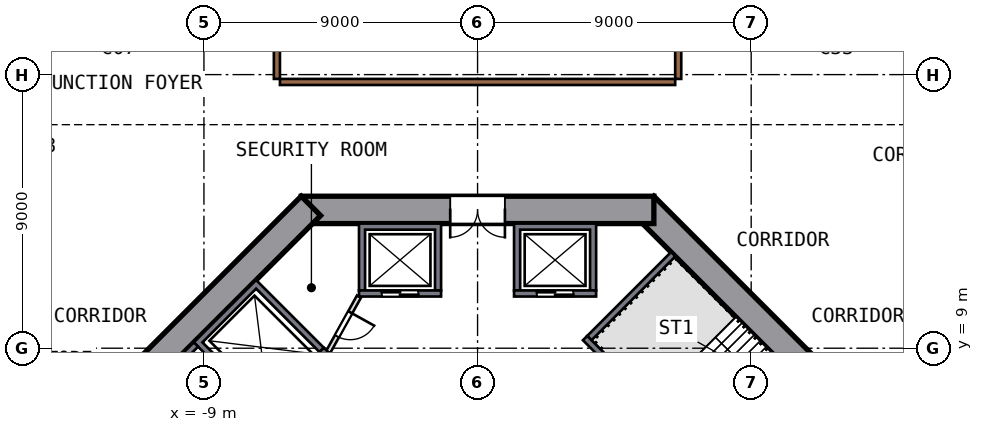
"""IFC4 building model, lengths in metres.
Left out: names, types, materials, properties, quantities, classifications, styles, units other than length and angle.
Written with IfcOpenShell. Run it as: python <this file> out.ifc"""

import sys

from ifc_helpers import new_model, si_unit, direction, frame, frame_2d, origin, place, context, subcontext, project, spatial, polyline, rectangle, outline, extrude, element, fill, save


model = new_model("IFC4")
c1 = context("Model", 3, precision=1e-05, world=origin(), true_north=direction((0.0, 1.0)))
c2 = subcontext(c1, "Body", "Model", "MODEL_VIEW")
j1 = project(units=[si_unit("LENGTHUNIT", "METRE"), si_unit("PLANEANGLEUNIT", "RADIAN")], contexts=[c1])
p1 = place(None, origin())
s1 = spatial("IfcSite", under=j1, at=p1, CompositionType="ELEMENT")
p2 = place(p1, origin())
s2 = spatial("IfcBuilding", under=s1, at=p2, CompositionType="ELEMENT")
p3 = place(p2, origin())
s3 = spatial("IfcBuildingStorey", under=s2, at=p3, CompositionType="ELEMENT", Elevation=0.0)
p4 = place(p3, frame((13.682, 5.481, 0.0), z_axis=(0.0, 0.0, 1.0), x_axis=(-0.707106781, 0.707106781, 0.0)))
e1 = element("IfcWall", 1, at=p4, inside=s3, PredefinedType="SHEAR", context=c2, shape_type="SweptSolid", body=[
    extrude(rectangle(XDim=11.598, YDim=0.9, at=frame_2d((5.799, 0.0))), origin(), (0.0, 0.0, 1.0), 8.0),
])
p5 = place(p4, frame((2.099, 0.0, 0.0)))
e2 = element("IfcOpeningElement", 2, at=p5, cuts=e1, PredefinedType="OPENING", context=c2, shape_type="SweptSolid", body=[
    extrude(rectangle(XDim=1.2, YDim=2.1, at=frame_2d((0.6, 1.05))), frame((0.0, 0.46, 0.0), z_axis=(0.0, -1.0, 0.0), x_axis=(1.0, 0.0, 0.0)), (0.0, 0.0, 1.0), 0.92),
])
p6 = place(p3, frame((5.799, 13.55, 0.0), z_axis=(0.0, 0.0, 1.0), x_axis=(-1.0, 0.0, 0.0)))
e3 = element("IfcWall", 3, at=p6, inside=s3, PredefinedType="SHEAR", context=c2, shape_type="SweptSolid", body=[
    extrude(rectangle(XDim=11.598, YDim=0.9, at=frame_2d((5.799, 0.0))), origin(), (0.0, 0.0, 1.0), 8.0),
])
p7 = place(p6, frame((4.899, 0.0, 0.0)))
e4 = element("IfcOpeningElement", 4, at=p7, cuts=e3, PredefinedType="OPENING", context=c2, shape_type="SweptSolid", body=[
    extrude(rectangle(XDim=1.8, YDim=2.1, at=frame_2d((0.9, 1.05))), frame((0.0, 0.46, 0.0), z_axis=(0.0, -1.0, 0.0), x_axis=(1.0, 0.0, 0.0)), (0.0, 0.0, 1.0), 0.92),
])
p8 = place(p3, frame((-5.481, 13.682, 0.0), z_axis=(0.0, 0.0, 1.0), x_axis=(-0.707106781, -0.707106781, 0.0)))
e5 = element("IfcWall", 5, at=p8, inside=s3, PredefinedType="SHEAR", context=c2, shape_type="SweptSolid", body=[
    extrude(rectangle(XDim=11.598, YDim=0.9, at=frame_2d((5.799, 0.0))), origin(), (0.0, 0.0, 1.0), 8.0),
])
p9 = place(p3, origin())
e6 = element("IfcWall", 6, at=p9, inside=s3, PredefinedType="SOLIDWALL", context=c2, shape_type="SweptSolid", body=[
    extrude(outline(polyline([(3.9, 13.1), (3.9, 10.9), (3.7, 10.9), (3.7, 12.9), (1.4, 12.9), (1.4, 10.9), (1.2, 10.9), (1.2, 13.1), (3.9, 13.1)])), origin(), (0.0, 0.0, 1.0), 7.55),
])
p10 = place(p3, frame((1.2, 10.8, 0.0), z_axis=(0.0, 0.0, 1.0), x_axis=(1.0, 0.0, 0.0)))
e7 = element("IfcWall", 7, at=p10, inside=s3, PredefinedType="SOLIDWALL", context=c2, shape_type="SweptSolid", body=[
    extrude(rectangle(XDim=2.7, YDim=0.2, at=frame_2d((1.35, 0.0))), origin(), (0.0, 0.0, 1.0), 7.55),
])
p11 = place(p10, frame((0.75, 0.0, 0.0)))
e8 = element("IfcOpeningElement", 8, at=p11, cuts=e7, PredefinedType="OPENING", context=c2, shape_type="SweptSolid", body=[
    extrude(rectangle(XDim=1.2, YDim=2.1, at=frame_2d((0.6, 1.05))), frame((0.0, 0.11, 0.0), z_axis=(0.0, -1.0, 0.0), x_axis=(1.0, 0.0, 0.0)), (0.0, 0.0, 1.0), 0.22),
])
p12 = place(p3, origin())
e9 = element("IfcWall", 9, at=p12, inside=s3, PredefinedType="SOLIDWALL", context=c2, shape_type="SweptSolid", body=[
    extrude(outline(polyline([(-3.9, 10.9), (-3.9, 13.1), (-1.2, 13.1), (-1.2, 10.9), (-1.4, 10.9), (-1.4, 12.9), (-3.7, 12.9), (-3.7, 10.9), (-3.9, 10.9)])), origin(), (0.0, 0.0, 1.0), 7.55),
])
p13 = place(p3, frame((-1.2, 10.8, 0.0), z_axis=(0.0, 0.0, 1.0), x_axis=(-1.0, 0.0, 0.0)))
e10 = element("IfcWall", 10, at=p13, inside=s3, PredefinedType="SOLIDWALL", context=c2, shape_type="SweptSolid", body=[
    extrude(rectangle(XDim=2.7, YDim=0.2, at=frame_2d((1.35, 0.0))), origin(), (0.0, 0.0, 1.0), 7.55),
])
p14 = place(p13, frame((0.75, 0.0, 0.0)))
e11 = element("IfcOpeningElement", 11, at=p14, cuts=e10, PredefinedType="OPENING", context=c2, shape_type="SweptSolid", body=[
    extrude(rectangle(XDim=1.2, YDim=2.1, at=frame_2d((0.6, 1.05))), frame((0.0, 0.11, 0.0), z_axis=(0.0, -1.0, 0.0), x_axis=(1.0, 0.0, 0.0)), (0.0, 0.0, 1.0), 0.22),
])
p15 = place(p3, origin())
e12 = element("IfcWall", 12, at=p15, inside=s3, PredefinedType="SOLIDWALL", context=c2, shape_type="SweptSolid", body=[
    extrude(outline(polyline([(-9.334, 9.192), (-7.283, 11.243), (-5.056, 9.016), (-5.197, 8.874), (-7.283, 10.96), (-9.051, 9.192), (-6.965, 7.106), (-7.106, 6.965), (-9.334, 9.192)])), origin(), (0.0, 0.0, 1.0), 7.55),
])
p16 = place(p3, frame((-4.985, 8.945, 0.0), z_axis=(0.0, 0.0, 1.0), x_axis=(-0.707106781, -0.707106781, 0.0)))
e13 = element("IfcWall", 13, at=p16, inside=s3, PredefinedType="SOLIDWALL", context=c2, shape_type="SweptSolid", body=[
    extrude(rectangle(XDim=2.9, YDim=0.2, at=frame_2d((1.45, 0.0))), origin(), (0.0, 0.0, 1.0), 7.55),
])
p17 = place(p16, frame((0.85, 0.0, 0.0)))
e14 = element("IfcOpeningElement", 14, at=p17, cuts=e13, PredefinedType="OPENING", context=c2, shape_type="SweptSolid", body=[
    extrude(rectangle(XDim=1.2, YDim=2.1, at=frame_2d((0.6, 1.05))), frame((0.0, 0.11, 0.0), z_axis=(0.0, -1.0, 0.0), x_axis=(1.0, 0.0, 0.0)), (0.0, 0.0, 1.0), 0.22),
])
p18 = place(p3, origin())
e15 = element("IfcWall", 15, at=p18, inside=s3, PredefinedType="SOLIDWALL", context=c2, shape_type="SweptSolid", body=[
    extrude(outline(polyline([(-11.243, 7.283), (-9.334, 9.192), (-9.192, 9.051), (-10.96, 7.283), (-8.874, 5.197), (-9.016, 5.056), (-11.243, 7.283)])), origin(), (0.0, 0.0, 1.0), 7.55),
])
p19 = place(p3, frame((3.535, 9.334, 0.0), z_axis=(0.0, 0.0, 1.0), x_axis=(0.707106781, -0.707106781, 0.0)))
e16 = element("IfcWall", 16, at=p19, inside=s3, PredefinedType="SOLIDWALL", context=c2, shape_type="SweptSolid", body=[
    extrude(rectangle(XDim=8.2, YDim=0.2, at=frame_2d((4.1, 0.0))), origin(), (0.0, 0.0, 1.0), 7.55),
])
p20 = place(p19, frame((6.6, 0.0, 0.0)))
e17 = element("IfcOpeningElement", 17, at=p20, cuts=e16, PredefinedType="OPENING", context=c2, shape_type="SweptSolid", body=[
    extrude(rectangle(XDim=1.2, YDim=2.1, at=frame_2d((0.6, 1.05))), frame((0.0, 0.11, 0.0), z_axis=(0.0, -1.0, 0.0), x_axis=(1.0, 0.0, 0.0)), (0.0, 0.0, 1.0), 0.22),
])
p21 = place(p3, frame((3.677, 9.334, 0.0), z_axis=(0.0, 0.0, 1.0), x_axis=(0.707106781, 0.707106781, 0.0)))
e18 = element("IfcWall", 18, at=p21, inside=s3, PredefinedType="SOLIDWALL", context=c2, shape_type="SweptSolid", body=[
    extrude(rectangle(XDim=3.9, YDim=0.2, at=frame_2d((1.95, 0.0))), origin(), (0.0, 0.0, 1.0), 7.55),
])
p22 = place(p3, frame((-3.9, 10.7, 0.0), z_axis=(0.0, 0.0, 1.0), x_axis=(-0.485692555, -0.874129705, 0.0)))
e19 = element("IfcWall", 19, at=p22, inside=s3, PredefinedType="PARTITIONING", context=c2, shape_type="SweptSolid", body=[
    extrude(rectangle(XDim=2.089, YDim=0.15, at=frame_2d((1.044, 0.0))), origin(), (0.0, 0.0, 1.0), 7.55),
])
p23 = place(p22, frame((0.594, 0.0, 0.0)))
e20 = element("IfcOpeningElement", 20, at=p23, cuts=e19, PredefinedType="OPENING", context=c2, shape_type="SweptSolid", body=[
    extrude(rectangle(XDim=0.9, YDim=2.1, at=frame_2d((0.45, 1.05))), frame((0.0, 0.085, 0.0), z_axis=(0.0, -1.0, 0.0), x_axis=(1.0, 0.0, 0.0)), (0.0, 0.0, 1.0), 0.17),
])
p24 = place(p3, frame((-6.5, 17.758, 0.0), z_axis=(0.0, 0.0, 1.0), x_axis=(1.0, 0.0, 0.0)))
e21 = element("IfcWall", 21, at=p24, inside=s3, PredefinedType="SOLIDWALL", context=c2, shape_type="SweptSolid", body=[
    extrude(rectangle(XDim=13.0, YDim=0.2, at=frame_2d((6.5, 0.0))), origin(), (0.0, 0.0, 1.0), 7.55),
])
p25 = place(p3, frame((-6.6, 17.858, 0.0), z_axis=(0.0, 0.0, 1.0), x_axis=(0.0, 1.0, 0.0)))
e22 = element("IfcWall", 22, at=p25, inside=s3, PredefinedType="SOLIDWALL", context=c2, shape_type="SweptSolid", body=[
    extrude(rectangle(XDim=5.557, YDim=0.2, at=frame_2d((2.778, 0.0))), origin(), (0.0, 0.0, 1.0), 7.55),
])
p26 = place(p25, frame((1.807, 0.0, 0.0)))
e23 = element("IfcOpeningElement", 23, at=p26, cuts=e22, PredefinedType="OPENING", context=c2, shape_type="SweptSolid", body=[
    extrude(rectangle(XDim=1.8, YDim=2.1, at=frame_2d((0.9, 1.05))), frame((0.0, 0.11, 0.0), z_axis=(0.0, -1.0, 0.0), x_axis=(1.0, 0.0, 0.0)), (0.0, 0.0, 1.0), 0.22),
])
p27 = place(p3, frame((6.6, 17.858, 0.0), z_axis=(0.0, 0.0, 1.0), x_axis=(0.0, 1.0, 0.0)))
e24 = element("IfcWall", 24, at=p27, inside=s3, PredefinedType="SOLIDWALL", context=c2, shape_type="SweptSolid", body=[
    extrude(rectangle(XDim=5.557, YDim=0.2, at=frame_2d((2.778, 0.0))), origin(), (0.0, 0.0, 1.0), 7.55),
])
p28 = place(p3, frame((17.693, 17.796, 0.0), z_axis=(0.0, 0.0, 1.0), x_axis=(-0.866027563, 0.499996261, 0.0)))
e25 = element("IfcWall", 25, at=p28, inside=s3, PredefinedType="PARTITIONING", context=c2, shape_type="SweptSolid", body=[
    extrude(rectangle(XDim=12.709, YDim=0.15, at=frame_2d((6.355, 0.0))), origin(), (0.0, 0.0, 1.0), 7.55),
])
p29 = place(p28, frame((7.36, 0.0, 0.0)))
e26 = element("IfcOpeningElement", 26, at=p29, cuts=e25, PredefinedType="OPENING", context=c2, shape_type="SweptSolid", body=[
    extrude(rectangle(XDim=1.0, YDim=2.1, at=frame_2d((0.5, 1.05))), frame((0.0, 0.085, 0.0), z_axis=(0.0, -1.0, 0.0), x_axis=(1.0, 0.0, 0.0)), (0.0, 0.0, 1.0), 0.17),
])
p30 = place(p11, origin())
e27 = element("IfcDoor", 27, at=p30, inside=s3, OperationType="DOUBLE_DOOR_SLIDING", PredefinedType="DOOR", context=c2, shape_type="SweptSolid", body=[
    extrude(rectangle(XDim=1.2, YDim=2.1, at=frame_2d((0.6, 1.05))), frame((0.0, 0.025, 0.0), z_axis=(0.0, -1.0, 0.0), x_axis=(1.0, 0.0, 0.0)), (0.0, 0.0, 1.0), 0.05),
])
fill(e8, e27)
p31 = place(p14, origin())
e28 = element("IfcDoor", 28, at=p31, inside=s3, OperationType="DOUBLE_DOOR_SLIDING", PredefinedType="DOOR", context=c2, shape_type="SweptSolid", body=[
    extrude(rectangle(XDim=1.2, YDim=2.1, at=frame_2d((0.6, 1.05))), frame((0.0, 0.025, 0.0), z_axis=(0.0, -1.0, 0.0), x_axis=(1.0, 0.0, 0.0)), (0.0, 0.0, 1.0), 0.05),
])
fill(e11, e28)
p32 = place(p7, origin())
e29 = element("IfcDoor", 29, at=p32, inside=s3, OperationType="DOUBLE_DOOR_SINGLE_SWING", PredefinedType="DOOR", context=c2, shape_type="SweptSolid", body=[
    extrude(rectangle(XDim=1.8, YDim=2.1, at=frame_2d((0.9, 1.05))), frame((0.0, 0.025, 0.0), z_axis=(0.0, -1.0, 0.0), x_axis=(1.0, 0.0, 0.0)), (0.0, 0.0, 1.0), 0.05),
])
fill(e4, e29)
p33 = place(p23, origin())
e30 = element("IfcDoor", 30, at=p33, inside=s3, OperationType="SINGLE_SWING_LEFT", PredefinedType="DOOR", context=c2, shape_type="SweptSolid", body=[
    extrude(rectangle(XDim=0.9, YDim=2.1, at=frame_2d((0.45, 1.05))), frame((0.0, 0.025, 0.0), z_axis=(0.0, -1.0, 0.0), x_axis=(1.0, 0.0, 0.0)), (0.0, 0.0, 1.0), 0.05),
])
fill(e20, e30)
save(model, sys.argv[1])
